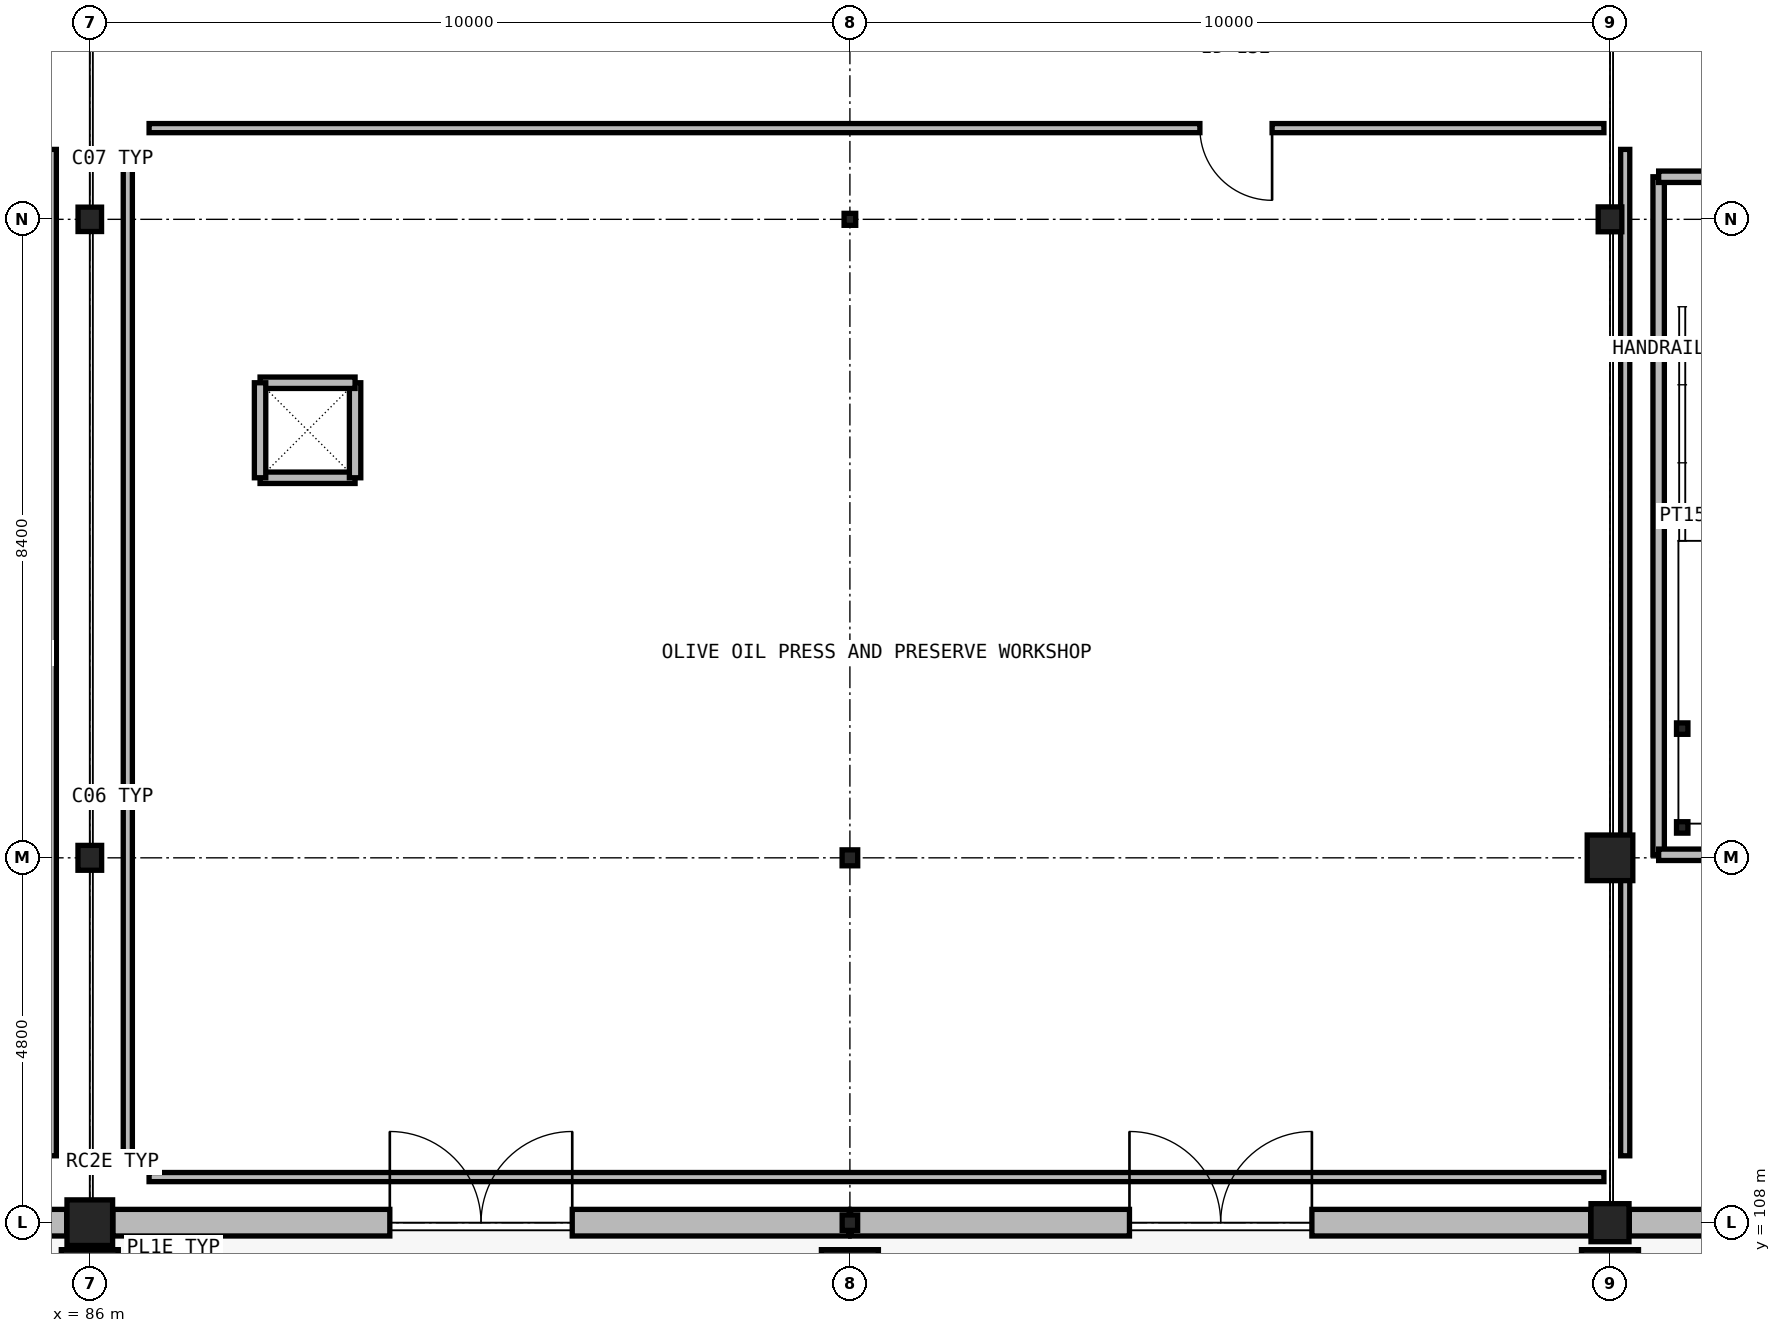
"""IFC4 building model, lengths in metres.
Left out: names, types, materials, properties, quantities, classifications, styles, units other than length and angle.
Written with IfcOpenShell. Run it as: python <this file> out.ifc"""

import sys

from ifc_helpers import new_model, si_unit, direction, frame, frame_2d, origin, origin_2d_with_axis, place, context, subcontext, project, spatial, rectangle, hollow_rectangle, i_section, extrude, element, fill, save


model = new_model("IFC4")
c1 = context("Model", 3, precision=1e-05, world=origin(), true_north=direction((0.0, 1.0)))
c2 = subcontext(c1, "Body", "Model", "MODEL_VIEW")
j1 = project(units=[si_unit("LENGTHUNIT", "METRE"), si_unit("PLANEANGLEUNIT", "RADIAN")], contexts=[c1])
p1 = place(None, origin())
s1 = spatial("IfcSite", under=j1, at=p1, CompositionType="ELEMENT")
p2 = place(p1, origin())
s2 = spatial("IfcBuilding", under=s1, at=p2, CompositionType="ELEMENT")
p3 = place(p2, origin())
s3 = spatial("IfcBuildingStorey", under=s2, at=p3, CompositionType="ELEMENT", Elevation=0.0)
for number, where, z_axis, x_axis in (
    (1, (86.0, 107.42, 0.0), (0.0, 0.0, 1.0), (1.0, 0.0, 0.0)),
    (2, (96.0, 107.42, 0.0), (0.0, 0.0, 1.0), (1.0, 0.0, 0.0)),
    (3, (106.0, 107.42, 0.0), (0.0, 0.0, 1.0), (1.0, 0.0, 0.0)),
):
    element("IfcColumn", number, at=place(p3, frame(where, z_axis=z_axis, x_axis=x_axis)), inside=s3, PredefinedType="PILASTER", context=c2, shape_type="SweptSolid", body=[
        extrude(rectangle(XDim=0.75, YDim=0.45, at=origin_2d_with_axis()), origin(), (0.0, 0.0, 1.0), 4.5),
    ])
p4 = place(p3, frame((86.0, 108.0, 0.0), z_axis=(0.0, 0.0, 1.0), x_axis=(1.0, 0.0, 0.0)))
e4 = element("IfcColumn", 4, at=p4, inside=s3, PredefinedType="COLUMN", context=c2, shape_type="SweptSolid", body=[
    extrude(rectangle(XDim=0.6, YDim=0.6, at=origin_2d_with_axis()), origin(), (0.0, 0.0, 1.0), 4.5),
])
p5 = place(p3, frame((86.0, 112.8, 0.0), z_axis=(0.0, 0.0, 1.0), x_axis=(1.0, 0.0, 0.0)))
e5 = element("IfcColumn", 5, at=p5, inside=s3, PredefinedType="COLUMN", context=c2, shape_type="SweptSolid", body=[
    extrude(i_section(OverallWidth=0.311, OverallDepth=0.327, WebThickness=0.016, FlangeThickness=0.025, FilletRadius=0.017, at=origin_2d_with_axis()), origin(), (0.0, 0.0, 1.0), 4.5),
])
p6 = place(p3, frame((86.0, 121.2, 0.0), z_axis=(0.0, 0.0, 1.0), x_axis=(1.0, 0.0, 0.0)))
e6 = element("IfcColumn", 6, at=p6, inside=s3, PredefinedType="COLUMN", context=c2, shape_type="SweptSolid", body=[
    extrude(i_section(OverallWidth=0.309, OverallDepth=0.321, WebThickness=0.014, FlangeThickness=0.022, FilletRadius=0.017, at=origin_2d_with_axis()), origin(), (0.0, 0.0, 1.0), 4.5),
])
p7 = place(p3, frame((96.0, 108.0, 0.0), z_axis=(0.0, 0.0, 1.0), x_axis=(1.0, 0.0, 0.0)))
e7 = element("IfcColumn", 7, at=p7, inside=s3, PredefinedType="COLUMN", context=c2, shape_type="SweptSolid", body=[
    extrude(i_section(OverallWidth=0.203, OverallDepth=0.203, WebThickness=0.007, FlangeThickness=0.011, FilletRadius=0.011, at=origin_2d_with_axis()), origin(), (0.0, 0.0, 1.0), 4.5),
])
p8 = place(p3, frame((96.0, 112.8, 0.0), z_axis=(0.0, 0.0, 1.0), x_axis=(1.0, 0.0, 0.0)))
e8 = element("IfcColumn", 8, at=p8, inside=s3, PredefinedType="COLUMN", context=c2, shape_type="SweptSolid", body=[
    extrude(i_section(OverallWidth=0.205, OverallDepth=0.21, WebThickness=0.009, FlangeThickness=0.014, FilletRadius=0.011, at=origin_2d_with_axis()), origin(), (0.0, 0.0, 1.0), 4.5),
])
p9 = place(p3, frame((96.0, 121.2, 0.0), z_axis=(0.0, 0.0, 1.0), x_axis=(1.0, 0.0, 0.0)))
e9 = element("IfcColumn", 9, at=p9, inside=s3, PredefinedType="COLUMN", context=c2, shape_type="SweptSolid", body=[
    extrude(i_section(OverallWidth=0.153, OverallDepth=0.158, WebThickness=0.007, FlangeThickness=0.01, FilletRadius=0.009, at=origin_2d_with_axis()), origin(), (0.0, 0.0, 1.0), 4.5),
])
p10 = place(p3, frame((106.0, 108.0, -0.28), z_axis=(0.0, 0.0, 1.0), x_axis=(1.0, 0.0, 0.0)))
e10 = element("IfcColumn", 10, at=p10, inside=s3, PredefinedType="COLUMN", context=c2, shape_type="SweptSolid", body=[
    extrude(rectangle(XDim=0.5, YDim=0.5, at=origin_2d_with_axis()), origin(), (0.0, 0.0, 1.0), 4.78),
])
p11 = place(p3, frame((106.0, 112.8, -0.28), z_axis=(0.0, 0.0, 1.0), x_axis=(1.0, 0.0, 0.0)))
e11 = element("IfcColumn", 11, at=p11, inside=s3, PredefinedType="COLUMN", context=c2, shape_type="SweptSolid", body=[
    extrude(rectangle(XDim=0.6, YDim=0.6, at=origin_2d_with_axis()), origin(), (0.0, 0.0, 1.0), 4.78),
])
p12 = place(p3, frame((106.0, 121.2, 0.0), z_axis=(0.0, 0.0, 1.0), x_axis=(1.0, 0.0, 0.0)))
e12 = element("IfcColumn", 12, at=p12, inside=s3, PredefinedType="COLUMN", context=c2, shape_type="SweptSolid", body=[
    extrude(i_section(OverallWidth=0.311, OverallDepth=0.327, WebThickness=0.016, FlangeThickness=0.025, FilletRadius=0.017, at=origin_2d_with_axis()), origin(), (0.0, 0.0, 1.0), 4.5),
])
for number, where, z_axis, x_axis in (
    (13, (106.95, 113.2, 0.0), (0.0, 0.0, 1.0), (1.0, 0.0, 0.0)),
    (14, (106.95, 114.5, 0.0), (0.0, 0.0, 1.0), (1.0, 0.0, 0.0)),
):
    element("IfcColumn", number, at=place(p3, frame(where, z_axis=z_axis, x_axis=x_axis)), inside=s3, PredefinedType="COLUMN", context=c2, shape_type="SweptSolid", body=[
        extrude(hollow_rectangle(XDim=0.15, YDim=0.15, WallThickness=0.006, InnerFilletRadius=0.006, OuterFilletRadius=0.012, at=origin_2d_with_axis()), origin(), (0.0, 0.0, 1.0), 4.5),
    ])
p13 = place(p3, frame((76.01, 108.0, 0.0), z_axis=(0.0, 0.0, 1.0), x_axis=(1.0, 0.0, 0.0)))
e15 = element("IfcWall", 15, at=p13, inside=s3, PredefinedType="SOLIDWALL", context=c2, shape_type="SweptSolid", body=[
    extrude(rectangle(XDim=9.686, YDim=0.35, at=frame_2d((4.843, 0.0), x_axis=(1.0, 0.0))), origin(), (0.0, 0.0, 1.0), 3.88),
])
p14 = place(p13, frame((3.643, 0.0, 0.0)))
e16 = element("IfcOpeningElement", 16, at=p14, cuts=e15, PredefinedType="OPENING", context=c2, shape_type="SweptSolid", body=[
    extrude(rectangle(XDim=2.4, YDim=2.8, at=frame_2d((1.2, 1.4), x_axis=(1.0, 0.0))), frame((0.0, 0.185, 0.0), z_axis=(0.0, -1.0, 0.0), x_axis=(1.0, 0.0, 0.0)), (0.0, 0.0, 1.0), 0.37),
])
p15 = place(p3, frame((86.304, 108.0, 0.0), z_axis=(0.0, 0.0, 1.0), x_axis=(1.0, 0.0, 0.0)))
e17 = element("IfcWall", 17, at=p15, inside=s3, PredefinedType="SOLIDWALL", context=c2, shape_type="SweptSolid", body=[
    extrude(rectangle(XDim=9.686, YDim=0.35, at=frame_2d((4.843, 0.0), x_axis=(1.0, 0.0))), origin(), (0.0, 0.0, 1.0), 3.88),
])
p16 = place(p15, frame((3.643, 0.0, 0.0)))
e18 = element("IfcOpeningElement", 18, at=p16, cuts=e17, PredefinedType="OPENING", context=c2, shape_type="SweptSolid", body=[
    extrude(rectangle(XDim=2.4, YDim=2.8, at=frame_2d((1.2, 1.4), x_axis=(1.0, 0.0))), frame((0.0, 0.185, 0.0), z_axis=(0.0, -1.0, 0.0), x_axis=(1.0, 0.0, 0.0)), (0.0, 0.0, 1.0), 0.37),
])
p17 = place(p3, frame((96.01, 108.0, 0.0), z_axis=(0.0, 0.0, 1.0), x_axis=(1.0, 0.0, 0.0)))
e19 = element("IfcWall", 19, at=p17, inside=s3, PredefinedType="SOLIDWALL", context=c2, shape_type="SweptSolid", body=[
    extrude(rectangle(XDim=9.736, YDim=0.35, at=frame_2d((4.868, 0.0), x_axis=(1.0, 0.0))), origin(), (0.0, 0.0, 1.0), 3.88),
])
p18 = place(p17, frame((3.668, 0.0, 0.0)))
e20 = element("IfcOpeningElement", 20, at=p18, cuts=e19, PredefinedType="OPENING", context=c2, shape_type="SweptSolid", body=[
    extrude(rectangle(XDim=2.4, YDim=2.8, at=frame_2d((1.2, 1.4), x_axis=(1.0, 0.0))), frame((0.0, 0.185, 0.0), z_axis=(0.0, -1.0, 0.0), x_axis=(1.0, 0.0, 0.0)), (0.0, 0.0, 1.0), 0.37),
])
p19 = place(p3, frame((106.254, 108.0, 0.0), z_axis=(0.0, 0.0, 1.0), x_axis=(1.0, 0.0, 0.0)))
e21 = element("IfcWall", 21, at=p19, inside=s3, PredefinedType="SOLIDWALL", context=c2, shape_type="SweptSolid", body=[
    extrude(rectangle(XDim=9.736, YDim=0.35, at=frame_2d((4.868, 0.0), x_axis=(1.0, 0.0))), origin(), (0.0, 0.0, 1.0), 3.88),
])
p20 = place(p19, frame((3.668, 0.0, 0.0)))
e22 = element("IfcOpeningElement", 22, at=p20, cuts=e21, PredefinedType="OPENING", context=c2, shape_type="SweptSolid", body=[
    extrude(rectangle(XDim=2.4, YDim=2.8, at=frame_2d((1.2, 1.4), x_axis=(1.0, 0.0))), frame((0.0, 0.185, 0.0), z_axis=(0.0, -1.0, 0.0), x_axis=(1.0, 0.0, 0.0)), (0.0, 0.0, 1.0), 0.37),
])
p21 = place(p3, frame((106.64, 121.76, 0.0), z_axis=(0.0, 0.0, 1.0), x_axis=(0.0, -1.0, 0.0)))
e23 = element("IfcWall", 23, at=p21, inside=s3, PredefinedType="PARTITIONING", context=c2, shape_type="SweptSolid", body=[
    extrude(rectangle(XDim=8.92, YDim=0.15, at=frame_2d((4.46, 0.0), x_axis=(1.0, 0.0))), origin(), (0.0, 0.0, 1.0), 3.66),
])
p22 = place(p3, frame((106.64, 112.84, 0.0), z_axis=(0.0, 0.0, 1.0), x_axis=(1.0, 0.0, 0.0)))
e24 = element("IfcWall", 24, at=p22, inside=s3, PredefinedType="PARTITIONING", context=c2, shape_type="SweptSolid", body=[
    extrude(rectangle(XDim=3.62, YDim=0.15, at=frame_2d((1.81, 0.0), x_axis=(1.0, 0.0))), origin(), (0.0, 0.0, 1.0), 3.66),
])
p23 = place(p3, frame((110.26, 121.76, 0.0), z_axis=(0.0, 0.0, 1.0), x_axis=(-1.0, 0.0, 0.0)))
e25 = element("IfcWall", 25, at=p23, inside=s3, PredefinedType="PARTITIONING", context=c2, shape_type="SweptSolid", body=[
    extrude(rectangle(XDim=3.62, YDim=0.15, at=frame_2d((1.81, 0.0), x_axis=(1.0, 0.0))), origin(), (0.0, 0.0, 1.0), 3.66),
])
p24 = place(p23, frame((1.31, 0.0, 0.0)))
e26 = element("IfcOpeningElement", 26, at=p24, cuts=e25, PredefinedType="OPENING", context=c2, shape_type="SweptSolid", body=[
    extrude(rectangle(XDim=1.0, YDim=2.15, at=frame_2d((0.5, 1.075), x_axis=(1.0, 0.0))), frame((0.0, 0.085, 0.0), z_axis=(0.0, -1.0, 0.0), x_axis=(1.0, 0.0, 0.0)), (0.0, 0.0, 1.0), 0.17),
])
for number, where, z_axis, x_axis in (
    (27, (88.24, 117.8, 0.0), (0.0, 0.0, 1.0), (1.0, 0.0, 0.0)),
    (28, (89.49, 117.8, 0.0), (0.0, 0.0, 1.0), (0.0, 1.0, 0.0)),
    (29, (89.49, 119.05, 0.0), (0.0, 0.0, 1.0), (-1.0, 0.0, 0.0)),
    (30, (88.24, 119.05, 0.0), (0.0, 0.0, 1.0), (0.0, -1.0, 0.0)),
):
    element("IfcWall", number, at=place(p3, frame(where, z_axis=z_axis, x_axis=x_axis)), inside=s3, PredefinedType="PARTITIONING", context=c2, shape_type="SweptSolid", body=[
        extrude(rectangle(XDim=1.25, YDim=0.15, at=frame_2d((0.625, 0.0), x_axis=(1.0, 0.0))), origin(), (0.0, 0.0, 1.0), 3.76),
    ])
p25 = place(p3, frame((85.5, 108.88, 0.0), z_axis=(0.0, 0.0, 1.0), x_axis=(0.0, 1.0, 0.0)))
e31 = element("IfcWall", 31, at=p25, inside=s3, PredefinedType="PARTITIONING", context=c2, shape_type="SweptSolid", body=[
    extrude(rectangle(XDim=13.24, YDim=0.12, at=frame_2d((6.62, 0.0), x_axis=(1.0, 0.0))), origin(), (0.0, 0.0, 1.0), 3.62),
])
p26 = place(p3, frame((86.78, 108.6, 0.0), z_axis=(0.0, 0.0, 1.0), x_axis=(1.0, 0.0, 0.0)))
e32 = element("IfcWall", 32, at=p26, inside=s3, PredefinedType="PARTITIONING", context=c2, shape_type="SweptSolid", body=[
    extrude(rectangle(XDim=19.14, YDim=0.12, at=frame_2d((9.57, 0.0), x_axis=(1.0, 0.0))), origin(), (0.0, 0.0, 1.0), 3.62),
])
p27 = place(p3, frame((106.2, 108.88, 0.0), z_axis=(0.0, 0.0, 1.0), x_axis=(0.0, 1.0, 0.0)))
e33 = element("IfcWall", 33, at=p27, inside=s3, PredefinedType="PARTITIONING", context=c2, shape_type="SweptSolid", body=[
    extrude(rectangle(XDim=13.24, YDim=0.12, at=frame_2d((6.62, 0.0), x_axis=(1.0, 0.0))), origin(), (0.0, 0.0, 1.0), 3.62),
])
p28 = place(p3, frame((105.92, 122.4, 0.0), z_axis=(0.0, 0.0, 1.0), x_axis=(-1.0, 0.0, 0.0)))
e34 = element("IfcWall", 34, at=p28, inside=s3, PredefinedType="PARTITIONING", context=c2, shape_type="SweptSolid", body=[
    extrude(rectangle(XDim=19.14, YDim=0.12, at=frame_2d((9.57, 0.0), x_axis=(1.0, 0.0))), origin(), (0.0, 0.0, 1.0), 3.62),
])
p29 = place(p28, frame((4.365, 0.0, 0.0)))
e35 = element("IfcOpeningElement", 35, at=p29, cuts=e34, PredefinedType="OPENING", context=c2, shape_type="SweptSolid", body=[
    extrude(rectangle(XDim=0.95, YDim=2.15, at=frame_2d((0.475, 1.075), x_axis=(1.0, 0.0))), frame((0.0, 0.07, 0.0), z_axis=(0.0, -1.0, 0.0), x_axis=(1.0, 0.0, 0.0)), (0.0, 0.0, 1.0), 0.14),
])
p30 = place(p3, frame((86.5, 122.12, 0.0), z_axis=(0.0, 0.0, 1.0), x_axis=(0.0, -1.0, 0.0)))
e36 = element("IfcWall", 36, at=p30, inside=s3, PredefinedType="PARTITIONING", context=c2, shape_type="SweptSolid", body=[
    extrude(rectangle(XDim=13.24, YDim=0.12, at=frame_2d((6.62, 0.0), x_axis=(1.0, 0.0))), origin(), (0.0, 0.0, 1.0), 3.62),
])
p31 = place(p16, origin())
e37 = element("IfcDoor", 37, at=p31, inside=s3, OperationType="DOUBLE_SWING_LEFT", PredefinedType="DOOR", context=c2, shape_type="SweptSolid", body=[
    extrude(rectangle(XDim=2.4, YDim=2.8, at=frame_2d((1.2, 1.4), x_axis=(1.0, 0.0))), frame((0.0, 0.025, 0.0), z_axis=(0.0, -1.0, 0.0), x_axis=(1.0, 0.0, 0.0)), (0.0, 0.0, 1.0), 0.05),
])
fill(e18, e37)
p32 = place(p18, origin())
e38 = element("IfcDoor", 38, at=p32, inside=s3, OperationType="DOUBLE_SWING_LEFT", PredefinedType="DOOR", context=c2, shape_type="SweptSolid", body=[
    extrude(rectangle(XDim=2.4, YDim=2.8, at=frame_2d((1.2, 1.4), x_axis=(1.0, 0.0))), frame((0.0, 0.025, 0.0), z_axis=(0.0, -1.0, 0.0), x_axis=(1.0, 0.0, 0.0)), (0.0, 0.0, 1.0), 0.05),
])
fill(e20, e38)
p33 = place(p29, origin())
e39 = element("IfcDoor", 39, at=p33, inside=s3, OperationType="SINGLE_SWING_LEFT", PredefinedType="DOOR", context=c2, shape_type="SweptSolid", body=[
    extrude(rectangle(XDim=0.95, YDim=2.15, at=frame_2d((0.475, 1.075), x_axis=(1.0, 0.0))), frame((0.0, 0.025, 0.0), z_axis=(0.0, -1.0, 0.0), x_axis=(1.0, 0.0, 0.0)), (0.0, 0.0, 1.0), 0.05),
])
fill(e35, e39)
save(model, sys.argv[1])
